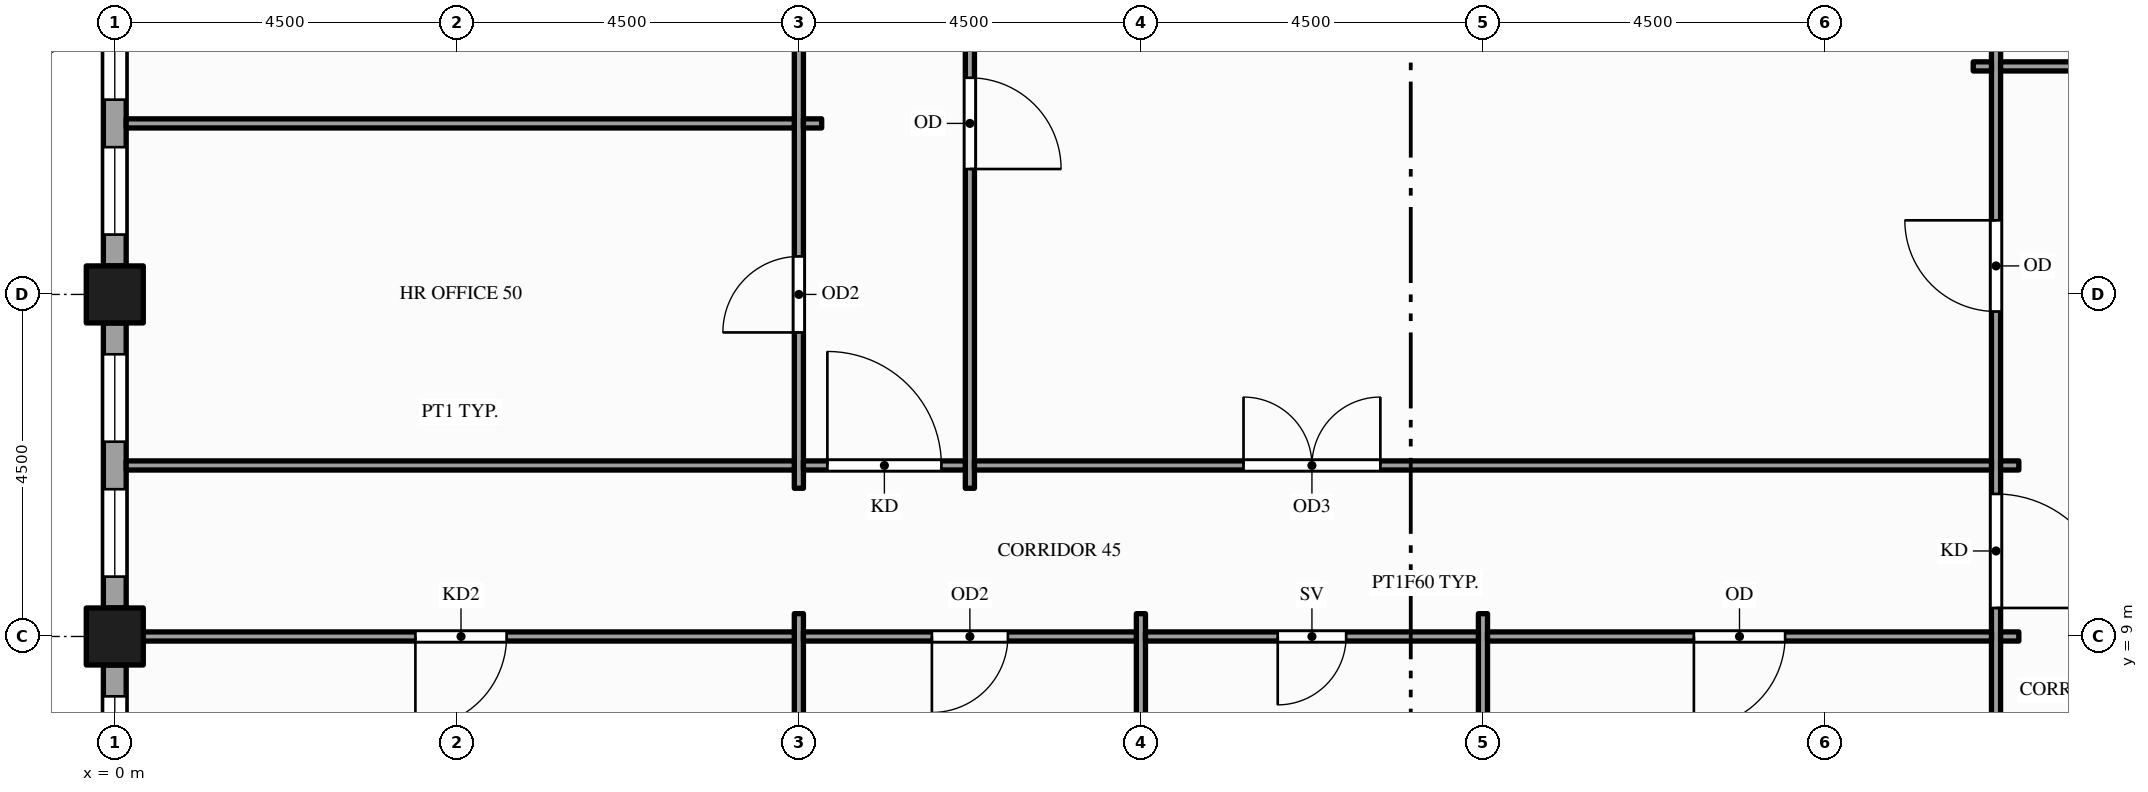
"""IFC4 building model, lengths in metres.
Left out: names, types, materials, properties, quantities, classifications, styles, units other than length and angle.
Written with IfcOpenShell. Run it as: python <this file> out.ifc"""

import sys

from ifc_helpers import new_model, si_unit, direction, frame, frame_2d, origin, origin_2d, place, context, subcontext, project, spatial, rectangle, hollow_rectangle, extrude, element, fill, save


model = new_model("IFC4")
c1 = context("Model", 3, precision=1e-05, world=origin(), true_north=direction((0.0, 1.0)))
c2 = subcontext(c1, "Body", "Model", "MODEL_VIEW")
j1 = project(units=[si_unit("LENGTHUNIT", "METRE"), si_unit("PLANEANGLEUNIT", "RADIAN")], contexts=[c1])
p1 = place(None, origin())
s1 = spatial("IfcSite", under=j1, at=p1, CompositionType="ELEMENT")
p2 = place(p1, origin())
s2 = spatial("IfcBuilding", under=s1, at=p2, CompositionType="ELEMENT")
p3 = place(p2, frame((0.0, 0.0, 199.0)))
s3 = spatial("IfcBuildingStorey", under=s2, at=p3, CompositionType="ELEMENT", Elevation=199.0)
for number, where, z_axis, x_axis in (
    (1, (0.0, 9.0, -0.15), (0.0, 0.0, 1.0), (1.0, 0.0, 0.0)),
    (2, (0.0, 13.5, -0.15), (0.0, 0.0, 1.0), (1.0, 0.0, 0.0)),
):
    element("IfcColumn", number, at=place(p3, frame(where, z_axis=z_axis, x_axis=x_axis)), inside=s3, PredefinedType="COLUMN", context=c2, shape_type="SweptSolid", body=[
        extrude(hollow_rectangle(XDim=0.75, YDim=0.75, WallThickness=0.036, at=origin_2d()), origin(), (0.0, 0.0, 1.0), 4.0),
    ])
p4 = place(p3, frame((0.0, 17.625, 0.0), z_axis=(0.0, 0.0, 1.0), x_axis=(0.0, -1.0, 0.0)))
e3 = element("IfcWall", 3, at=p4, inside=s3, PredefinedType="STANDARD", context=c2, shape_type="SweptSolid", body=[
    extrude(rectangle(XDim=3.75, YDim=0.3, at=frame_2d((1.875, 0.0))), origin(), (0.0, 0.0, 1.0), 3.157),
])
p5 = place(p4, frame((0.413, 0.0, 0.9)))
e4 = element("IfcOpeningElement", 4, at=p5, cuts=e3, PredefinedType="OPENING", context=c2, shape_type="SweptSolid", body=[
    extrude(rectangle(XDim=1.15, YDim=2.0, at=frame_2d((0.575, 1.0))), frame((0.0, 0.16, 0.0), z_axis=(0.0, -1.0, 0.0), x_axis=(1.0, 0.0, 0.0)), (0.0, 0.0, 1.0), 0.32),
])
p6 = place(p4, frame((2.188, 0.0, 0.9)))
e5 = element("IfcOpeningElement", 5, at=p6, cuts=e3, PredefinedType="OPENING", context=c2, shape_type="SweptSolid", body=[
    extrude(rectangle(XDim=1.15, YDim=2.0, at=frame_2d((0.575, 1.0))), frame((0.0, 0.16, 0.0), z_axis=(0.0, -1.0, 0.0), x_axis=(1.0, 0.0, 0.0)), (0.0, 0.0, 1.0), 0.32),
])
p7 = place(p3, frame((0.0, 13.125, 0.0), z_axis=(0.0, 0.0, 1.0), x_axis=(0.0, -1.0, 0.0)))
e6 = element("IfcWall", 6, at=p7, inside=s3, PredefinedType="STANDARD", context=c2, shape_type="SweptSolid", body=[
    extrude(rectangle(XDim=3.75, YDim=0.3, at=frame_2d((1.875, 0.0))), origin(), (0.0, 0.0, 1.0), 3.157),
])
p8 = place(p7, frame((0.413, 0.0, 0.9)))
e7 = element("IfcOpeningElement", 7, at=p8, cuts=e6, PredefinedType="OPENING", context=c2, shape_type="SweptSolid", body=[
    extrude(rectangle(XDim=1.15, YDim=2.0, at=frame_2d((0.575, 1.0))), frame((0.0, 0.16, 0.0), z_axis=(0.0, -1.0, 0.0), x_axis=(1.0, 0.0, 0.0)), (0.0, 0.0, 1.0), 0.32),
])
p9 = place(p7, frame((2.188, 0.0, 0.9)))
e8 = element("IfcOpeningElement", 8, at=p9, cuts=e6, PredefinedType="OPENING", context=c2, shape_type="SweptSolid", body=[
    extrude(rectangle(XDim=1.15, YDim=2.0, at=frame_2d((0.575, 1.0))), frame((0.0, 0.16, 0.0), z_axis=(0.0, -1.0, 0.0), x_axis=(1.0, 0.0, 0.0)), (0.0, 0.0, 1.0), 0.32),
])
p10 = place(p3, frame((0.0, 8.625, 0.0), z_axis=(0.0, 0.0, 1.0), x_axis=(0.0, -1.0, 0.0)))
e9 = element("IfcWall", 9, at=p10, inside=s3, PredefinedType="STANDARD", context=c2, shape_type="SweptSolid", body=[
    extrude(rectangle(XDim=3.75, YDim=0.3, at=frame_2d((1.875, 0.0))), origin(), (0.0, 0.0, 1.0), 3.157),
])
p11 = place(p10, frame((0.413, 0.0, 0.9)))
e10 = element("IfcOpeningElement", 10, at=p11, cuts=e9, PredefinedType="OPENING", context=c2, shape_type="SweptSolid", body=[
    extrude(rectangle(XDim=1.15, YDim=2.0, at=frame_2d((0.575, 1.0))), frame((0.0, 0.16, 0.0), z_axis=(0.0, -1.0, 0.0), x_axis=(1.0, 0.0, 0.0)), (0.0, 0.0, 1.0), 0.32),
])
p12 = place(p10, frame((2.188, 0.0, 0.9)))
e11 = element("IfcOpeningElement", 11, at=p12, cuts=e9, PredefinedType="OPENING", context=c2, shape_type="SweptSolid", body=[
    extrude(rectangle(XDim=1.15, YDim=2.0, at=frame_2d((0.575, 1.0))), frame((0.0, 0.16, 0.0), z_axis=(0.0, -1.0, 0.0), x_axis=(1.0, 0.0, 0.0)), (0.0, 0.0, 1.0), 0.32),
])
p13 = place(p3, frame((9.0, 3.875, 0.0), z_axis=(0.0, 0.0, 1.0), x_axis=(0.0, 1.0, 0.0)))
e12 = element("IfcWall", 12, at=p13, inside=s3, PredefinedType="PARTITIONING", context=c2, shape_type="SweptSolid", body=[
    extrude(rectangle(XDim=5.425, YDim=0.12, at=frame_2d((2.712, 0.0))), origin(), (0.0, 0.0, 1.0), 2.87),
])
p14 = place(p3, frame((9.0, 10.95, 0.0), z_axis=(0.0, 0.0, 1.0), x_axis=(0.0, 1.0, 0.0)))
e13 = element("IfcWall", 13, at=p14, inside=s3, PredefinedType="PARTITIONING", context=c2, shape_type="SweptSolid", body=[
    extrude(rectangle(XDim=20.85, YDim=0.12, at=frame_2d((10.425, 0.0))), origin(), (0.0, 0.0, 1.0), 2.6),
])
p15 = place(p14, frame((2.05, 0.0, 0.0)))
e14 = element("IfcOpeningElement", 14, at=p15, cuts=e13, PredefinedType="OPENING", context=c2, shape_type="SweptSolid", body=[
    extrude(rectangle(XDim=1.0, YDim=2.1, at=frame_2d((0.5, 1.05))), frame((0.0, 0.07, 0.0), z_axis=(0.0, -1.0, 0.0), x_axis=(1.0, 0.0, 0.0)), (0.0, 0.0, 1.0), 0.14),
])
p16 = place(p14, frame((6.55, 0.0, 0.0)))
e15 = element("IfcOpeningElement", 15, at=p16, cuts=e13, PredefinedType="OPENING", context=c2, shape_type="SweptSolid", body=[
    extrude(rectangle(XDim=1.0, YDim=2.1, at=frame_2d((0.5, 1.05))), frame((0.0, 0.07, 0.0), z_axis=(0.0, -1.0, 0.0), x_axis=(1.0, 0.0, 0.0)), (0.0, 0.0, 1.0), 0.14),
])
p17 = place(p14, frame((12.205, 0.0, 0.0)))
e16 = element("IfcOpeningElement", 16, at=p17, cuts=e13, PredefinedType="OPENING", context=c2, shape_type="SweptSolid", body=[
    extrude(rectangle(XDim=1.0, YDim=2.1, at=frame_2d((0.5, 1.05))), frame((0.0, 0.07, 0.0), z_axis=(0.0, -1.0, 0.0), x_axis=(1.0, 0.0, 0.0)), (0.0, 0.0, 1.0), 0.14),
])
p18 = place(p3, frame((11.25, 10.95, 0.0), z_axis=(0.0, 0.0, 1.0), x_axis=(0.0, 1.0, 0.0)))
e17 = element("IfcWall", 17, at=p18, inside=s3, PredefinedType="PARTITIONING", context=c2, shape_type="SweptSolid", body=[
    extrude(rectangle(XDim=20.85, YDim=0.12, at=frame_2d((10.425, 0.0))), origin(), (0.0, 0.0, 1.0), 2.6),
])
p19 = place(p18, frame((17.8, 0.0, 0.0)))
e18 = element("IfcOpeningElement", 18, at=p19, cuts=e17, PredefinedType="OPENING", context=c2, shape_type="SweptSolid", body=[
    extrude(rectangle(XDim=1.0, YDim=2.1, at=frame_2d((0.5, 1.05))), frame((0.0, 0.07, 0.0), z_axis=(0.0, -1.0, 0.0), x_axis=(1.0, 0.0, 0.0)), (0.0, 0.0, 1.0), 0.14),
])
p20 = place(p18, frame((4.2, 0.0, 0.0)))
e19 = element("IfcOpeningElement", 19, at=p20, cuts=e17, PredefinedType="OPENING", context=c2, shape_type="SweptSolid", body=[
    extrude(rectangle(XDim=1.2, YDim=2.1, at=frame_2d((0.6, 1.05))), frame((0.0, 0.07, 0.0), z_axis=(0.0, -1.0, 0.0), x_axis=(1.0, 0.0, 0.0)), (0.0, 0.0, 1.0), 0.14),
])
for number, where, z_axis, x_axis in (
    (20, (13.5, 0.15, 0.0), (0.0, 0.0, 1.0), (0.0, 1.0, 0.0)),
    (21, (18.0, 0.15, 0.0), (0.0, 0.0, 1.0), (0.0, 1.0, 0.0)),
):
    element("IfcWall", number, at=place(p3, frame(where, z_axis=z_axis, x_axis=x_axis)), inside=s3, PredefinedType="PARTITIONING", context=c2, shape_type="SweptSolid", body=[
        extrude(rectangle(XDim=9.15, YDim=0.12, at=frame_2d((4.575, 0.0))), origin(), (0.0, 0.0, 1.0), 2.87),
    ])
p21 = place(p3, frame((24.75, -1.35, 0.0), z_axis=(0.0, 0.0, 1.0), x_axis=(0.0, 1.0, 0.0)))
e22 = element("IfcWall", 22, at=p21, inside=s3, PredefinedType="PARTITIONING", context=c2, shape_type="SweptSolid", body=[
    extrude(rectangle(XDim=24.101, YDim=0.12, at=frame_2d((12.05, 0.0))), origin(), (0.0, 0.0, 1.0), 2.76),
])
p22 = place(p21, frame((10.725, 0.0, 0.0)))
e23 = element("IfcOpeningElement", 23, at=p22, cuts=e22, PredefinedType="OPENING", context=c2, shape_type="SweptSolid", body=[
    extrude(rectangle(XDim=1.5, YDim=2.1, at=frame_2d((0.75, 1.05))), frame((0.0, 0.07, 0.0), z_axis=(0.0, -1.0, 0.0), x_axis=(1.0, 0.0, 0.0)), (0.0, 0.0, 1.0), 0.14),
])
p23 = place(p21, frame((14.625, 0.0, 0.0)))
e24 = element("IfcOpeningElement", 24, at=p23, cuts=e22, PredefinedType="OPENING", context=c2, shape_type="SweptSolid", body=[
    extrude(rectangle(XDim=1.2, YDim=2.1, at=frame_2d((0.6, 1.05))), frame((0.0, 0.07, 0.0), z_axis=(0.0, -1.0, 0.0), x_axis=(1.0, 0.0, 0.0)), (0.0, 0.0, 1.0), 0.14),
])
p24 = place(p3, frame((0.15, 9.0, 0.0), z_axis=(0.0, 0.0, 1.0), x_axis=(1.0, 0.0, 0.0)))
e25 = element("IfcWall", 25, at=p24, inside=s3, PredefinedType="PARTITIONING", context=c2, shape_type="SweptSolid", body=[
    extrude(rectangle(XDim=8.79, YDim=0.12, at=frame_2d((4.395, 0.0))), origin(), (0.0, 0.0, 1.0), 2.87),
])
p25 = place(p24, frame((3.805, 0.0, 0.0)))
e26 = element("IfcOpeningElement", 26, at=p25, cuts=e25, PredefinedType="OPENING", context=c2, shape_type="SweptSolid", body=[
    extrude(rectangle(XDim=1.2, YDim=2.1, at=frame_2d((0.6, 1.05))), frame((0.0, 0.07, 0.0), z_axis=(0.0, -1.0, 0.0), x_axis=(1.0, 0.0, 0.0)), (0.0, 0.0, 1.0), 0.14),
])
p26 = place(p3, frame((9.06, 9.0, 0.0), z_axis=(0.0, 0.0, 1.0), x_axis=(1.0, 0.0, 0.0)))
e27 = element("IfcWall", 27, at=p26, inside=s3, PredefinedType="PARTITIONING", context=c2, shape_type="SweptSolid", body=[
    extrude(rectangle(XDim=4.38, YDim=0.12, at=frame_2d((2.19, 0.0))), origin(), (0.0, 0.0, 1.0), 2.87),
])
p27 = place(p26, frame((1.69, 0.0, 0.0)))
e28 = element("IfcOpeningElement", 28, at=p27, cuts=e27, PredefinedType="OPENING", context=c2, shape_type="SweptSolid", body=[
    extrude(rectangle(XDim=1.0, YDim=2.1, at=frame_2d((0.5, 1.05))), frame((0.0, 0.07, 0.0), z_axis=(0.0, -1.0, 0.0), x_axis=(1.0, 0.0, 0.0)), (0.0, 0.0, 1.0), 0.14),
])
p28 = place(p3, frame((13.56, 9.0, 0.0), z_axis=(0.0, 0.0, 1.0), x_axis=(1.0, 0.0, 0.0)))
e29 = element("IfcWall", 29, at=p28, inside=s3, PredefinedType="PARTITIONING", context=c2, shape_type="SweptSolid", body=[
    extrude(rectangle(XDim=4.38, YDim=0.12, at=frame_2d((2.19, 0.0))), origin(), (0.0, 0.0, 1.0), 2.87),
])
p29 = place(p28, frame((1.74, 0.0, 0.0)))
e30 = element("IfcOpeningElement", 30, at=p29, cuts=e29, PredefinedType="OPENING", context=c2, shape_type="SweptSolid", body=[
    extrude(rectangle(XDim=0.9, YDim=2.1, at=frame_2d((0.45, 1.05))), frame((0.0, 0.07, 0.0), z_axis=(0.0, -1.0, 0.0), x_axis=(1.0, 0.0, 0.0)), (0.0, 0.0, 1.0), 0.14),
])
p30 = place(p3, frame((18.06, 9.0, 0.0), z_axis=(0.0, 0.0, 1.0), x_axis=(1.0, 0.0, 0.0)))
e31 = element("IfcWall", 31, at=p30, inside=s3, PredefinedType="PARTITIONING", context=c2, shape_type="SweptSolid", body=[
    extrude(rectangle(XDim=6.63, YDim=0.12, at=frame_2d((3.315, 0.0))), origin(), (0.0, 0.0, 1.0), 2.76),
])
p31 = place(p30, frame((2.715, 0.0, 0.0)))
e32 = element("IfcOpeningElement", 32, at=p31, cuts=e31, PredefinedType="OPENING", context=c2, shape_type="SweptSolid", body=[
    extrude(rectangle(XDim=1.2, YDim=2.1, at=frame_2d((0.6, 1.05))), frame((0.0, 0.07, 0.0), z_axis=(0.0, -1.0, 0.0), x_axis=(1.0, 0.0, 0.0)), (0.0, 0.0, 1.0), 0.14),
])
p32 = place(p3, frame((24.81, 9.0, 0.0), z_axis=(0.0, 0.0, 1.0), x_axis=(1.0, 0.0, 0.0)))
e33 = element("IfcWall", 33, at=p32, inside=s3, PredefinedType="PARTITIONING", context=c2, shape_type="SweptSolid", body=[
    extrude(rectangle(XDim=0.24, YDim=0.12, at=frame_2d((0.12, 0.0))), origin(), (0.0, 0.0, 1.0), 2.76),
])
p33 = place(p3, frame((0.15, 11.25, 0.0), z_axis=(0.0, 0.0, 1.0), x_axis=(1.0, 0.0, 0.0)))
e34 = element("IfcWall", 34, at=p33, inside=s3, PredefinedType="PARTITIONING", context=c2, shape_type="SweptSolid", body=[
    extrude(rectangle(XDim=8.79, YDim=0.12, at=frame_2d((4.395, 0.0))), origin(), (0.0, 0.0, 1.0), 2.87),
])
p34 = place(p3, frame((9.06, 11.25, 0.0), z_axis=(0.0, 0.0, 1.0), x_axis=(1.0, 0.0, 0.0)))
e35 = element("IfcWall", 35, at=p34, inside=s3, PredefinedType="PARTITIONING", context=c2, shape_type="SweptSolid", body=[
    extrude(rectangle(XDim=2.13, YDim=0.12, at=frame_2d((1.065, 0.0))), origin(), (0.0, 0.0, 1.0), 2.87),
])
p35 = place(p34, frame((0.315, 0.0, 0.0)))
e36 = element("IfcOpeningElement", 36, at=p35, cuts=e35, PredefinedType="OPENING", context=c2, shape_type="SweptSolid", body=[
    extrude(rectangle(XDim=1.5, YDim=2.1, at=frame_2d((0.75, 1.05))), frame((0.0, 0.07, 0.0), z_axis=(0.0, -1.0, 0.0), x_axis=(1.0, 0.0, 0.0)), (0.0, 0.0, 1.0), 0.14),
])
p36 = place(p3, frame((11.31, 11.25, 0.0), z_axis=(0.0, 0.0, 1.0), x_axis=(1.0, 0.0, 0.0)))
e37 = element("IfcWall", 37, at=p36, inside=s3, PredefinedType="PARTITIONING", context=c2, shape_type="SweptSolid", body=[
    extrude(rectangle(XDim=13.38, YDim=0.12, at=frame_2d((6.69, 0.0))), origin(), (0.0, 0.0, 1.0), 2.76),
])
p37 = place(p36, frame((3.54, 0.0, 0.0)))
e38 = element("IfcOpeningElement", 38, at=p37, cuts=e37, PredefinedType="OPENING", context=c2, shape_type="SweptSolid", body=[
    extrude(rectangle(XDim=1.8, YDim=2.1, at=frame_2d((0.9, 1.05))), frame((0.0, 0.07, 0.0), z_axis=(0.0, -1.0, 0.0), x_axis=(1.0, 0.0, 0.0)), (0.0, 0.0, 1.0), 0.14),
])
p38 = place(p3, frame((24.81, 11.25, 0.0), z_axis=(0.0, 0.0, 1.0), x_axis=(1.0, 0.0, 0.0)))
e39 = element("IfcWall", 39, at=p38, inside=s3, PredefinedType="PARTITIONING", context=c2, shape_type="SweptSolid", body=[
    extrude(rectangle(XDim=0.24, YDim=0.12, at=frame_2d((0.12, 0.0))), origin(), (0.0, 0.0, 1.0), 2.76),
])
p39 = place(p3, frame((0.15, 15.75, 0.0), z_axis=(0.0, 0.0, 1.0), x_axis=(1.0, 0.0, 0.0)))
e40 = element("IfcWall", 40, at=p39, inside=s3, PredefinedType="PARTITIONING", context=c2, shape_type="SweptSolid", body=[
    extrude(rectangle(XDim=8.79, YDim=0.12, at=frame_2d((4.395, 0.0))), origin(), (0.0, 0.0, 1.0), 2.87),
])
p40 = place(p3, frame((9.06, 15.75, 0.0), z_axis=(0.0, 0.0, 1.0), x_axis=(1.0, 0.0, 0.0)))
e41 = element("IfcWall", 41, at=p40, inside=s3, PredefinedType="PARTITIONING", context=c2, shape_type="SweptSolid", body=[
    extrude(rectangle(XDim=0.24, YDim=0.12, at=frame_2d((0.12, 0.0))), origin(), (0.0, 0.0, 1.0), 2.87),
])
p41 = place(p3, frame((24.45, 16.5, 0.0), z_axis=(0.0, 0.0, 1.0), x_axis=(1.0, 0.0, 0.0)))
e42 = element("IfcWall", 42, at=p41, inside=s3, PredefinedType="PARTITIONING", context=c2, shape_type="SweptSolid", body=[
    extrude(rectangle(XDim=0.24, YDim=0.12, at=frame_2d((0.12, 0.0))), origin(), (0.0, 0.0, 1.0), 2.76),
])
p42 = place(p3, frame((24.81, 16.5, 0.0), z_axis=(0.0, 0.0, 1.0), x_axis=(1.0, 0.0, 0.0)))
e43 = element("IfcWall", 43, at=p42, inside=s3, PredefinedType="PARTITIONING", context=c2, shape_type="SweptSolid", body=[
    extrude(rectangle(XDim=2.13, YDim=0.12, at=frame_2d((1.065, 0.0))), origin(), (0.0, 0.0, 1.0), 2.76),
])
p43 = place(p5, origin())
e44 = element("IfcWindow", 44, at=p43, inside=s3, PartitioningType="SINGLE_PANEL", PredefinedType="WINDOW", context=c2, shape_type="SweptSolid", body=[
    extrude(rectangle(XDim=1.15, YDim=2.0, at=frame_2d((0.575, 1.0))), frame((0.0, 0.03, 0.0), z_axis=(0.0, -1.0, 0.0), x_axis=(1.0, 0.0, 0.0)), (0.0, 0.0, 1.0), 0.06),
])
fill(e4, e44)
p44 = place(p6, origin())
e45 = element("IfcWindow", 45, at=p44, inside=s3, PartitioningType="SINGLE_PANEL", PredefinedType="WINDOW", context=c2, shape_type="SweptSolid", body=[
    extrude(rectangle(XDim=1.15, YDim=2.0, at=frame_2d((0.575, 1.0))), frame((0.0, 0.03, 0.0), z_axis=(0.0, -1.0, 0.0), x_axis=(1.0, 0.0, 0.0)), (0.0, 0.0, 1.0), 0.06),
])
fill(e5, e45)
p45 = place(p8, origin())
e46 = element("IfcWindow", 46, at=p45, inside=s3, PartitioningType="SINGLE_PANEL", PredefinedType="WINDOW", context=c2, shape_type="SweptSolid", body=[
    extrude(rectangle(XDim=1.15, YDim=2.0, at=frame_2d((0.575, 1.0))), frame((0.0, 0.03, 0.0), z_axis=(0.0, -1.0, 0.0), x_axis=(1.0, 0.0, 0.0)), (0.0, 0.0, 1.0), 0.06),
])
fill(e7, e46)
p46 = place(p9, origin())
e47 = element("IfcWindow", 47, at=p46, inside=s3, PartitioningType="SINGLE_PANEL", PredefinedType="WINDOW", context=c2, shape_type="SweptSolid", body=[
    extrude(rectangle(XDim=1.15, YDim=2.0, at=frame_2d((0.575, 1.0))), frame((0.0, 0.03, 0.0), z_axis=(0.0, -1.0, 0.0), x_axis=(1.0, 0.0, 0.0)), (0.0, 0.0, 1.0), 0.06),
])
fill(e8, e47)
p47 = place(p11, origin())
e48 = element("IfcWindow", 48, at=p47, inside=s3, PartitioningType="SINGLE_PANEL", PredefinedType="WINDOW", context=c2, shape_type="SweptSolid", body=[
    extrude(rectangle(XDim=1.15, YDim=2.0, at=frame_2d((0.575, 1.0))), frame((0.0, 0.03, 0.0), z_axis=(0.0, -1.0, 0.0), x_axis=(1.0, 0.0, 0.0)), (0.0, 0.0, 1.0), 0.06),
])
fill(e10, e48)
p48 = place(p22, origin())
e49 = element("IfcDoor", 49, at=p48, inside=s3, OperationType="SINGLE_SWING_LEFT", PredefinedType="DOOR", context=c2, shape_type="SweptSolid", body=[
    extrude(rectangle(XDim=1.5, YDim=2.1, at=frame_2d((0.75, 1.05))), frame((0.0, 0.025, 0.0), z_axis=(0.0, -1.0, 0.0), x_axis=(1.0, 0.0, 0.0)), (0.0, 0.0, 1.0), 0.05),
])
fill(e23, e49)
p49 = place(p25, origin())
e50 = element("IfcDoor", 50, at=p49, inside=s3, OperationType="SINGLE_SWING_LEFT", PredefinedType="DOOR", context=c2, shape_type="SweptSolid", body=[
    extrude(rectangle(XDim=1.2, YDim=2.1, at=frame_2d((0.6, 1.05))), frame((0.0, 0.025, 0.0), z_axis=(0.0, -1.0, 0.0), x_axis=(1.0, 0.0, 0.0)), (0.0, 0.0, 1.0), 0.05),
])
fill(e26, e50)
p50 = place(p27, origin())
e51 = element("IfcDoor", 51, at=p50, inside=s3, OperationType="SINGLE_SWING_LEFT", PredefinedType="DOOR", context=c2, shape_type="SweptSolid", body=[
    extrude(rectangle(XDim=1.0, YDim=2.1, at=frame_2d((0.5, 1.05))), frame((0.0, 0.025, 0.0), z_axis=(0.0, -1.0, 0.0), x_axis=(1.0, 0.0, 0.0)), (0.0, 0.0, 1.0), 0.05),
])
fill(e28, e51)
p51 = place(p29, origin())
e52 = element("IfcDoor", 52, at=p51, inside=s3, OperationType="SINGLE_SWING_LEFT", PredefinedType="DOOR", context=c2, shape_type="SweptSolid", body=[
    extrude(rectangle(XDim=0.9, YDim=2.1, at=frame_2d((0.45, 1.05))), frame((0.0, 0.025, 0.0), z_axis=(0.0, -1.0, 0.0), x_axis=(1.0, 0.0, 0.0)), (0.0, 0.0, 1.0), 0.05),
])
fill(e30, e52)
p52 = place(p31, origin())
e53 = element("IfcDoor", 53, at=p52, inside=s3, OperationType="SINGLE_SWING_LEFT", PredefinedType="DOOR", context=c2, shape_type="SweptSolid", body=[
    extrude(rectangle(XDim=1.2, YDim=2.1, at=frame_2d((0.6, 1.05))), frame((0.0, 0.025, 0.0), z_axis=(0.0, -1.0, 0.0), x_axis=(1.0, 0.0, 0.0)), (0.0, 0.0, 1.0), 0.05),
])
fill(e32, e53)
p53 = place(p37, origin())
e54 = element("IfcDoor", 54, at=p53, inside=s3, OperationType="DOUBLE_DOOR_SINGLE_SWING", PredefinedType="DOOR", context=c2, shape_type="SweptSolid", body=[
    extrude(rectangle(XDim=1.8, YDim=2.1, at=frame_2d((0.9, 1.05))), frame((0.0, 0.025, 0.0), z_axis=(0.0, -1.0, 0.0), x_axis=(1.0, 0.0, 0.0)), (0.0, 0.0, 1.0), 0.05),
])
fill(e38, e54)
p54 = place(p35, origin())
e55 = element("IfcDoor", 55, at=p54, inside=s3, OperationType="SINGLE_SWING_LEFT", PredefinedType="DOOR", context=c2, shape_type="SweptSolid", body=[
    extrude(rectangle(XDim=1.5, YDim=2.1, at=frame_2d((0.75, 1.05))), frame((0.0, 0.025, 0.0), z_axis=(0.0, -1.0, 0.0), x_axis=(1.0, 0.0, 0.0)), (0.0, 0.0, 1.0), 0.05),
])
fill(e36, e55)
p55 = place(p15, origin())
e56 = element("IfcDoor", 56, at=p55, inside=s3, OperationType="SINGLE_SWING_LEFT", PredefinedType="DOOR", context=c2, shape_type="SweptSolid", body=[
    extrude(rectangle(XDim=1.0, YDim=2.1, at=frame_2d((0.5, 1.05))), frame((0.0, 0.025, 0.0), z_axis=(0.0, -1.0, 0.0), x_axis=(1.0, 0.0, 0.0)), (0.0, 0.0, 1.0), 0.05),
])
fill(e14, e56)
p56 = place(p20, origin())
e57 = element("IfcDoor", 57, at=p56, inside=s3, OperationType="SINGLE_SWING_LEFT", PredefinedType="DOOR", context=c2, shape_type="SweptSolid", body=[
    extrude(rectangle(XDim=1.2, YDim=2.1, at=frame_2d((0.6, 1.05))), frame((0.0, 0.025, 0.0), z_axis=(0.0, -1.0, 0.0), x_axis=(1.0, 0.0, 0.0)), (0.0, 0.0, 1.0), 0.05),
])
fill(e19, e57)
p57 = place(p23, origin())
e58 = element("IfcDoor", 58, at=p57, inside=s3, OperationType="SINGLE_SWING_RIGHT", PredefinedType="DOOR", context=c2, shape_type="SweptSolid", body=[
    extrude(rectangle(XDim=1.2, YDim=2.1, at=frame_2d((0.6, 1.05))), frame((0.0, 0.025, 0.0), z_axis=(0.0, -1.0, 0.0), x_axis=(1.0, 0.0, 0.0)), (0.0, 0.0, 1.0), 0.05),
])
fill(e24, e58)
save(model, sys.argv[1])
